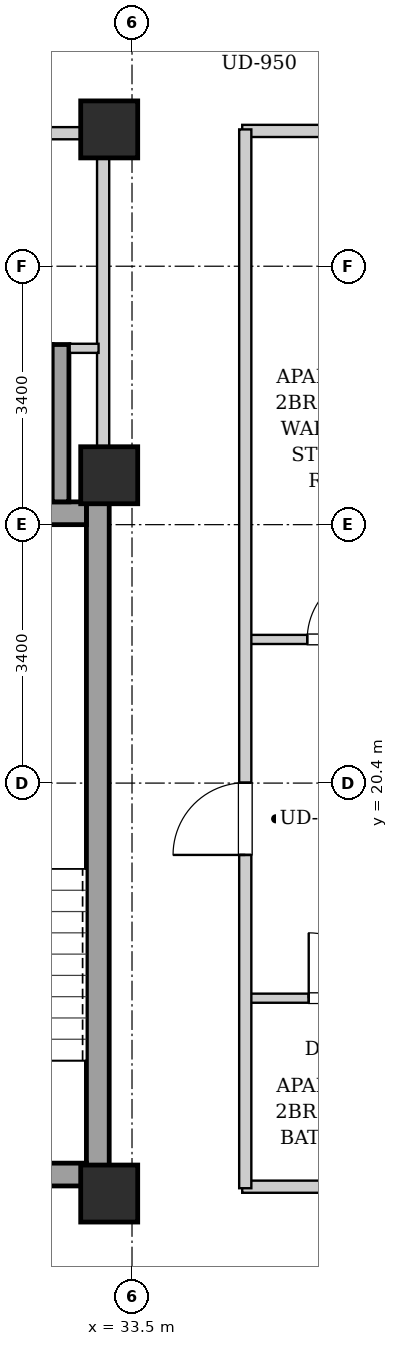
"""IFC4 building model, lengths in metres.
Left out: names, types, materials, properties, quantities, classifications, styles, units other than length and angle.
Written with IfcOpenShell. Run it as: python <this file> out.ifc"""

import sys

from ifc_helpers import new_model, si_unit, direction, frame, frame_2d, origin, origin_2d, place, context, subcontext, project, spatial, rectangle, extrude, element, fill, save


model = new_model("IFC4")
c1 = context("Model", 3, precision=1e-05, world=origin(), true_north=direction((0.0, 1.0)))
c2 = subcontext(c1, "Body", "Model", "MODEL_VIEW")
j1 = project(units=[si_unit("LENGTHUNIT", "METRE"), si_unit("PLANEANGLEUNIT", "RADIAN")], contexts=[c1])
p1 = place(None, origin())
s1 = spatial("IfcSite", under=j1, at=p1, CompositionType="ELEMENT")
p2 = place(p1, origin())
s2 = spatial("IfcBuilding", under=s1, at=p2, CompositionType="ELEMENT")
p3 = place(p2, frame((0.0, 0.0, 230.9)))
s3 = spatial("IfcBuildingStorey", under=s2, at=p3, CompositionType="ELEMENT", Elevation=230.9)
for number, where, z_axis, x_axis in (
    (1, (33.2, 15.0, 0.0), (0.0, 0.0, 1.0), (1.0, 0.0, 0.0)),
    (2, (33.2, 29.0, 0.0), (0.0, 0.0, 1.0), (1.0, 0.0, 0.0)),
    (3, (33.2, 24.45, 0.0), (0.0, 0.0, 1.0), (1.0, 0.0, 0.0)),
):
    element("IfcColumn", number, at=place(p3, frame(where, z_axis=z_axis, x_axis=x_axis)), inside=s3, PredefinedType="COLUMN", context=c2, shape_type="SweptSolid", body=[
        extrude(rectangle(XDim=0.75, YDim=0.75, at=origin_2d()), origin(), (0.0, 0.0, 1.0), 3.4),
    ])
p4 = place(p3, frame((33.05, 15.1, 0.0), z_axis=(0.0, 0.0, 1.0), x_axis=(0.0, 1.0, 0.0)))
e4 = element("IfcWall", 4, at=p4, inside=s3, PredefinedType="SHEAR", context=c2, shape_type="SweptSolid", body=[
    extrude(rectangle(XDim=9.0, YDim=0.3, at=frame_2d((4.5, 0.0))), origin(), (0.0, 0.0, 1.0), 3.14),
])
p5 = place(p3, frame((30.05, 23.95, 0.0), z_axis=(0.0, 0.0, 1.0), x_axis=(1.0, 0.0, 0.0)))
e5 = element("IfcWall", 5, at=p5, inside=s3, PredefinedType="SHEAR", context=c2, shape_type="SweptSolid", body=[
    extrude(rectangle(XDim=2.85, YDim=0.3, at=frame_2d((1.425, 0.0))), origin(), (0.0, 0.0, 1.0), 3.14),
])
p6 = place(p3, frame((30.05, 15.25, 0.0), z_axis=(0.0, 0.0, 1.0), x_axis=(1.0, 0.0, 0.0)))
e6 = element("IfcWall", 6, at=p6, inside=s3, PredefinedType="SHEAR", context=c2, shape_type="SweptSolid", body=[
    extrude(rectangle(XDim=2.85, YDim=0.3, at=frame_2d((1.425, 0.0))), origin(), (0.0, 0.0, 1.0), 3.14),
])
p7 = place(p6, frame((0.86, 0.0, 0.0)))
e7 = element("IfcOpeningElement", 7, at=p7, cuts=e6, PredefinedType="OPENING", context=c2, shape_type="SweptSolid", body=[
    extrude(rectangle(XDim=1.1, YDim=2.05, at=frame_2d((0.55, 1.025))), frame((0.0, 0.16, 0.0), z_axis=(0.0, -1.0, 0.0), x_axis=(1.0, 0.0, 0.0)), (0.0, 0.0, 1.0), 0.32),
])
p8 = place(p3, frame((32.56, 24.1, 0.0), z_axis=(0.0, 0.0, 1.0), x_axis=(0.0, 1.0, 0.0)))
e8 = element("IfcWall", 8, at=p8, inside=s3, PredefinedType="SHEAR", context=c2, shape_type="SweptSolid", body=[
    extrude(rectangle(XDim=2.07, YDim=0.22, at=frame_2d((1.035, 0.0))), origin(), (0.0, 0.0, 1.0), 3.14),
])
p9 = place(p3, frame((33.12, 24.12, 0.0), z_axis=(0.0, 0.0, 1.0), x_axis=(0.0, 1.0, 0.0)))
e9 = element("IfcWall", 9, at=p9, inside=s3, PredefinedType="PARTITIONING", context=c2, shape_type="SweptSolid", body=[
    extrude(rectangle(XDim=4.76, YDim=0.16, at=frame_2d((2.38, 0.0))), origin(), (0.0, 0.0, 1.0), 3.14),
])
p10 = place(p3, frame((32.68, 26.12, 0.0), z_axis=(0.0, 0.0, 1.0), x_axis=(1.0, 0.0, 0.0)))
e10 = element("IfcWall", 10, at=p10, inside=s3, PredefinedType="PARTITIONING", context=c2, shape_type="SweptSolid", body=[
    extrude(rectangle(XDim=0.38, YDim=0.12, at=frame_2d((0.19, 0.0))), origin(), (0.0, 0.0, 1.0), 3.14),
])
p11 = place(p3, frame((30.08, 28.95, 0.0), z_axis=(0.0, 0.0, 1.0), x_axis=(1.0, 0.0, 0.0)))
e11 = element("IfcWall", 11, at=p11, inside=s3, PredefinedType="PARTITIONING", context=c2, shape_type="SweptSolid", body=[
    extrude(rectangle(XDim=2.96, YDim=0.16, at=frame_2d((1.48, 0.0))), origin(), (0.0, 0.0, 1.0), 3.14),
])
p12 = place(p11, frame((0.695, 0.0, 0.0)))
e12 = element("IfcOpeningElement", 12, at=p12, cuts=e11, PredefinedType="OPENING", context=c2, shape_type="SweptSolid", body=[
    extrude(rectangle(XDim=0.86, YDim=2.05, at=frame_2d((0.43, 1.025))), frame((0.0, 0.09, 0.0), z_axis=(0.0, -1.0, 0.0), x_axis=(1.0, 0.0, 0.0)), (0.0, 0.0, 1.0), 0.18),
])
for number, where, z_axis, x_axis in (
    (13, (34.95, 15.09, 0.0), (0.0, 0.0, 1.0), (1.0, 0.0, 0.0)),
    (14, (34.95, 28.98, 0.0), (0.0, 0.0, 1.0), (1.0, 0.0, 0.0)),
):
    element("IfcWall", number, at=place(p3, frame(where, z_axis=z_axis, x_axis=x_axis)), inside=s3, PredefinedType="PARTITIONING", context=c2, shape_type="SweptSolid", body=[
        extrude(rectangle(XDim=5.07, YDim=0.16, at=frame_2d((2.535, 0.0))), origin(), (0.0, 0.0, 1.0), 2.668),
    ])
p13 = place(p3, frame((35.03, 22.29, 0.0), z_axis=(0.0, 0.0, 1.0), x_axis=(1.0, 0.0, 0.0)))
e15 = element("IfcWall", 15, at=p13, inside=s3, PredefinedType="PARTITIONING", context=c2, shape_type="SweptSolid", body=[
    extrude(rectangle(XDim=2.45, YDim=0.12, at=frame_2d((1.225, 0.0))), origin(), (0.0, 0.0, 1.0), 3.14),
])
p14 = place(p13, frame((0.775, 0.0, 0.0)))
e16 = element("IfcOpeningElement", 16, at=p14, cuts=e15, PredefinedType="OPENING", context=c2, shape_type="SweptSolid", body=[
    extrude(rectangle(XDim=0.9, YDim=2.05, at=frame_2d((0.45, 1.025))), frame((0.0, 0.07, 0.0), z_axis=(0.0, -1.0, 0.0), x_axis=(1.0, 0.0, 0.0)), (0.0, 0.0, 1.0), 0.14),
])
p15 = place(p3, frame((35.03, 17.57, 0.0), z_axis=(0.0, 0.0, 1.0), x_axis=(1.0, 0.0, 0.0)))
e17 = element("IfcWall", 17, at=p15, inside=s3, PredefinedType="PARTITIONING", context=c2, shape_type="SweptSolid", body=[
    extrude(rectangle(XDim=2.45, YDim=0.12, at=frame_2d((1.225, 0.0))), origin(), (0.0, 0.0, 1.0), 3.14),
])
p16 = place(p15, frame((0.795, 0.0, 0.0)))
e18 = element("IfcOpeningElement", 18, at=p16, cuts=e17, PredefinedType="OPENING", context=c2, shape_type="SweptSolid", body=[
    extrude(rectangle(XDim=0.86, YDim=2.05, at=frame_2d((0.43, 1.025))), frame((0.0, 0.07, 0.0), z_axis=(0.0, -1.0, 0.0), x_axis=(1.0, 0.0, 0.0)), (0.0, 0.0, 1.0), 0.14),
])
p17 = place(p3, frame((34.99, 15.07, 0.0), z_axis=(0.0, 0.0, 1.0), x_axis=(0.0, 1.0, 0.0)))
e19 = element("IfcWall", 19, at=p17, inside=s3, PredefinedType="PARTITIONING", context=c2, shape_type="SweptSolid", body=[
    extrude(rectangle(XDim=13.93, YDim=0.16, at=frame_2d((6.965, 0.0))), origin(), (0.0, 0.0, 1.0), 3.14),
])
p18 = place(p17, frame((4.385, 0.0, 0.0)))
e20 = element("IfcOpeningElement", 20, at=p18, cuts=e19, PredefinedType="OPENING", context=c2, shape_type="SweptSolid", body=[
    extrude(rectangle(XDim=0.95, YDim=2.1, at=frame_2d((0.475, 1.05))), frame((0.0, 0.09, 0.0), z_axis=(0.0, -1.0, 0.0), x_axis=(1.0, 0.0, 0.0)), (0.0, 0.0, 1.0), 0.18),
])
p19 = place(p14, origin())
e21 = element("IfcDoor", 21, at=p19, inside=s3, OperationType="SINGLE_SWING_RIGHT", PredefinedType="DOOR", context=c2, shape_type="SweptSolid", body=[
    extrude(rectangle(XDim=0.9, YDim=2.05, at=frame_2d((0.45, 1.025))), frame((0.0, 0.025, 0.0), z_axis=(0.0, -1.0, 0.0), x_axis=(1.0, 0.0, 0.0)), (0.0, 0.0, 1.0), 0.05),
])
fill(e16, e21)
p20 = place(p16, origin())
e22 = element("IfcDoor", 22, at=p20, inside=s3, OperationType="SINGLE_SWING_LEFT", PredefinedType="DOOR", context=c2, shape_type="SweptSolid", body=[
    extrude(rectangle(XDim=0.86, YDim=2.05, at=frame_2d((0.43, 1.025))), frame((0.0, 0.025, 0.0), z_axis=(0.0, -1.0, 0.0), x_axis=(1.0, 0.0, 0.0)), (0.0, 0.0, 1.0), 0.05),
])
fill(e18, e22)
p21 = place(p18, origin())
e23 = element("IfcDoor", 23, at=p21, inside=s3, OperationType="SINGLE_SWING_LEFT", PredefinedType="DOOR", context=c2, shape_type="SweptSolid", body=[
    extrude(rectangle(XDim=0.95, YDim=2.1, at=frame_2d((0.475, 1.05))), frame((0.0, 0.025, 0.0), z_axis=(0.0, -1.0, 0.0), x_axis=(1.0, 0.0, 0.0)), (0.0, 0.0, 1.0), 0.05),
])
fill(e20, e23)
save(model, sys.argv[1])
